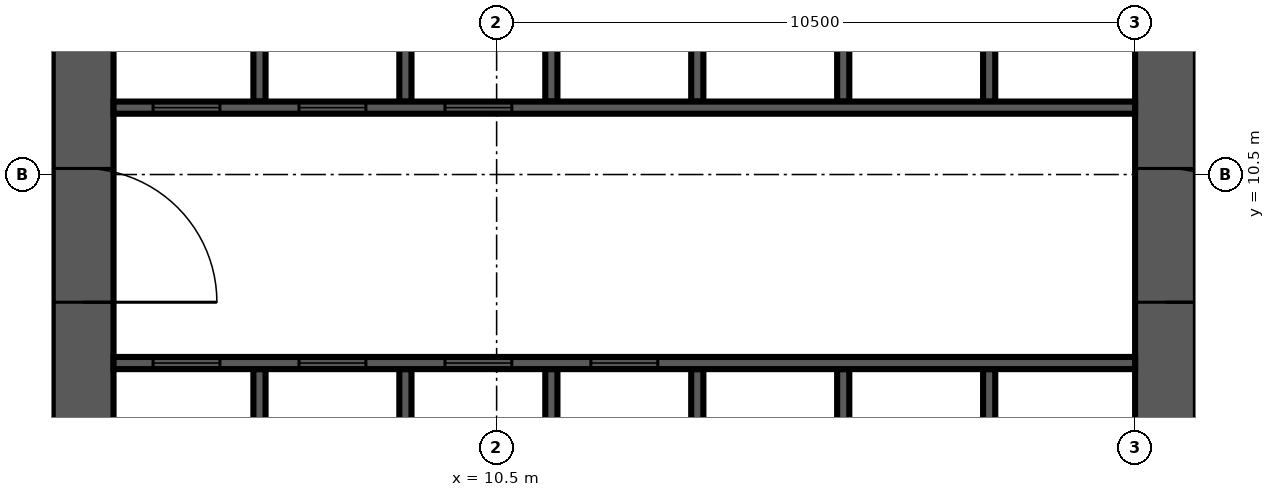
"""IFC4 building model, lengths in metres.
Left out: names, types, materials, properties, quantities, classifications, styles, units other than length and angle.
Written with IfcOpenShell. Run it as: python <this file> out.ifc"""

import sys

from ifc_helpers import new_model, si_unit, direction, frame, frame_2d, origin, place, context, subcontext, project, spatial, rectangle, extrude, source, transform, mapped, element, fill, save


model = new_model("IFC4")
c1 = context("Model", 3, precision=1e-05, world=origin(), true_north=direction((0.0, 1.0)))
c2 = subcontext(c1, "Body", "Model", "MODEL_VIEW")
j1 = project(units=[si_unit("LENGTHUNIT", "METRE"), si_unit("PLANEANGLEUNIT", "RADIAN")], contexts=[c1])
p1 = place(None, origin())
s1 = spatial("IfcSite", under=j1, at=p1, CompositionType="ELEMENT")
p2 = place(p1, origin())
s2 = spatial("IfcBuilding", under=s1, at=p2, CompositionType="ELEMENT")
p3 = place(p2, frame((0.0, 0.0, 141.3)))
s3 = spatial("IfcBuildingStorey", under=s2, at=p3, CompositionType="ELEMENT", Elevation=141.3)
m1 = source(origin(), c2, "Body", "SweptSolid", [
    extrude(rectangle(XDim=17.8, YDim=1.0, at=frame_2d((8.9, 0.0))), origin(), (0.0, 0.0, 1.0), 4.2),
])
p4 = place(p3, frame((3.7, 4.2, 0.0), z_axis=(0.0, 0.0, 1.0), x_axis=(0.0, 1.0, 0.0)))
e1 = element("IfcWall", 1, at=p4, inside=s3, PredefinedType="SHEAR", context=c2, shape_type="MappedRepresentation", body=[
    mapped(m1, transform((0.0, 0.0, 0.0), scale=1.0)),
])
m2 = source(origin(), c2, "Body", "SweptSolid", [
    extrude(rectangle(XDim=2.2, YDim=2.1, at=frame_2d((1.1, 1.05))), frame((0.0, 0.51, 0.0), z_axis=(0.0, -1.0, 0.0), x_axis=(1.0, 0.0, 0.0)), (0.0, 0.0, 1.0), 1.02),
])
p5 = place(p4, frame((4.2, 0.0, 0.0)))
e2 = element("IfcOpeningElement", 2, at=p5, cuts=e1, PredefinedType="OPENING", context=c2, shape_type="MappedRepresentation", body=[
    mapped(m2, transform((0.0, 0.0, 0.0), scale=1.0)),
])
m3 = source(origin(), c2, "Body", "SweptSolid", [
    extrude(rectangle(XDim=0.9, YDim=2.1, at=frame_2d((0.45, 1.05))), frame((0.0, 0.51, 0.0), z_axis=(0.0, -1.0, 0.0), x_axis=(1.0, 0.0, 0.0)), (0.0, 0.0, 1.0), 1.02),
])
p6 = place(p4, frame((10.95, 0.0, 0.0)))
e3 = element("IfcOpeningElement", 3, at=p6, cuts=e1, PredefinedType="OPENING", context=c2, shape_type="MappedRepresentation", body=[
    mapped(m3, transform((0.0, 0.0, 0.0), scale=1.0)),
])
m4 = source(origin(), c2, "Body", "SweptSolid", [
    extrude(rectangle(XDim=16.8, YDim=1.0, at=frame_2d((8.4, 0.0))), origin(), (0.0, 0.0, 1.0), 4.2),
])
p7 = place(p3, frame((21.5, 4.2, 0.0), z_axis=(0.0, 0.0, 1.0), x_axis=(0.0, 1.0, 0.0)))
e4 = element("IfcWall", 4, at=p7, inside=s3, PredefinedType="SHEAR", context=c2, shape_type="MappedRepresentation", body=[
    mapped(m4, transform((0.0, 0.0, 0.0), scale=1.0)),
])
p8 = place(p7, frame((4.2, 0.0, 0.0)))
e5 = element("IfcOpeningElement", 5, at=p8, cuts=e4, PredefinedType="OPENING", context=c2, shape_type="MappedRepresentation", body=[
    mapped(m2, transform((0.0, 0.0, 0.0), scale=1.0)),
])
m5 = source(origin(), c2, "Body", "SweptSolid", [
    extrude(rectangle(XDim=1.2, YDim=2.1, at=frame_2d((0.6, 1.05))), frame((0.0, 0.51, 0.0), z_axis=(0.0, -1.0, 0.0), x_axis=(1.0, 0.0, 0.0)), (0.0, 0.0, 1.0), 1.02),
])
p9 = place(p7, frame((14.7, 0.0, 0.0)))
e6 = element("IfcOpeningElement", 6, at=p9, cuts=e4, PredefinedType="OPENING", context=c2, shape_type="MappedRepresentation", body=[
    mapped(m5, transform((0.0, 0.0, 0.0), scale=1.0)),
])
m6 = source(origin(), c2, "Body", "SweptSolid", [
    extrude(rectangle(XDim=3.1, YDim=0.2, at=frame_2d((1.55, 0.0))), origin(), (0.0, 0.0, 1.0), 4.2),
])
for number, where, z_axis, x_axis in (
    (7, (6.6, 4.2, 0.0), (0.0, 0.0, 1.0), (0.0, 1.0, 0.0)),
    (8, (9.0, 4.2, 0.0), (0.0, 0.0, 1.0), (0.0, 1.0, 0.0)),
    (9, (11.4, 4.2, 0.0), (0.0, 0.0, 1.0), (0.0, 1.0, 0.0)),
    (10, (13.8, 4.2, 0.0), (0.0, 0.0, 1.0), (0.0, 1.0, 0.0)),
    (11, (16.2, 4.2, 0.0), (0.0, 0.0, 1.0), (0.0, 1.0, 0.0)),
    (12, (18.6, 4.2, 0.0), (0.0, 0.0, 1.0), (0.0, 1.0, 0.0)),
):
    element("IfcWall", number, at=place(p3, frame(where, z_axis=z_axis, x_axis=x_axis)), inside=s3, PredefinedType="SOLIDWALL", context=c2, shape_type="MappedRepresentation", body=[
        mapped(m6, transform((0.0, 0.0, 0.0), scale=1.0)),
    ])
m7 = source(origin(), c2, "Body", "SweptSolid", [
    extrude(rectangle(XDim=3.0, YDim=0.2, at=frame_2d((1.5, 0.0))), origin(), (0.0, 0.0, 1.0), 4.2),
])
for number, where, z_axis, x_axis in (
    (13, (6.6, 11.7, 0.0), (0.0, 0.0, 1.0), (0.0, 1.0, 0.0)),
    (14, (9.0, 11.7, 0.0), (0.0, 0.0, 1.0), (0.0, 1.0, 0.0)),
    (15, (11.4, 11.7, 0.0), (0.0, 0.0, 1.0), (0.0, 1.0, 0.0)),
    (16, (13.8, 11.7, 0.0), (0.0, 0.0, 1.0), (0.0, 1.0, 0.0)),
    (17, (16.2, 11.7, 0.0), (0.0, 0.0, 1.0), (0.0, 1.0, 0.0)),
    (18, (18.6, 11.7, 0.0), (0.0, 0.0, 1.0), (0.0, 1.0, 0.0)),
):
    element("IfcWall", number, at=place(p3, frame(where, z_axis=z_axis, x_axis=x_axis)), inside=s3, PredefinedType="SOLIDWALL", context=c2, shape_type="MappedRepresentation", body=[
        mapped(m7, transform((0.0, 0.0, 0.0), scale=1.0)),
    ])
m8 = source(origin(), c2, "Body", "SweptSolid", [
    extrude(rectangle(XDim=16.8, YDim=0.2, at=frame_2d((8.4, 0.0))), origin(), (0.0, 0.0, 1.0), 4.2),
])
p10 = place(p3, frame((4.2, 7.4, 0.0), z_axis=(0.0, 0.0, 1.0), x_axis=(1.0, 0.0, 0.0)))
e19 = element("IfcWall", 19, at=p10, inside=s3, PredefinedType="SOLIDWALL", context=c2, shape_type="MappedRepresentation", body=[
    mapped(m8, transform((0.0, 0.0, 0.0), scale=1.0)),
])
m9 = source(origin(), c2, "Body", "SweptSolid", [
    extrude(rectangle(XDim=1.1, YDim=2.1, at=frame_2d((0.55, 1.05))), frame((0.0, 0.11, 0.0), z_axis=(0.0, -1.0, 0.0), x_axis=(1.0, 0.0, 0.0)), (0.0, 0.0, 1.0), 0.22),
])
p11 = place(p10, frame((0.65, 0.0, 0.0)))
e20 = element("IfcOpeningElement", 20, at=p11, cuts=e19, PredefinedType="OPENING", context=c2, shape_type="MappedRepresentation", body=[
    mapped(m9, transform((0.0, 0.0, 0.0), scale=1.0)),
])
p12 = place(p10, frame((3.05, 0.0, 0.0)))
e21 = element("IfcOpeningElement", 21, at=p12, cuts=e19, PredefinedType="OPENING", context=c2, shape_type="MappedRepresentation", body=[
    mapped(m9, transform((0.0, 0.0, 0.0), scale=1.0)),
])
p13 = place(p10, frame((5.45, 0.0, 0.0)))
e22 = element("IfcOpeningElement", 22, at=p13, cuts=e19, PredefinedType="OPENING", context=c2, shape_type="MappedRepresentation", body=[
    mapped(m9, transform((0.0, 0.0, 0.0), scale=1.0)),
])
p14 = place(p10, frame((7.85, 0.0, 0.0)))
e23 = element("IfcOpeningElement", 23, at=p14, cuts=e19, PredefinedType="OPENING", context=c2, shape_type="MappedRepresentation", body=[
    mapped(m9, transform((0.0, 0.0, 0.0), scale=1.0)),
])
p15 = place(p3, frame((4.2, 11.6, 0.0), z_axis=(0.0, 0.0, 1.0), x_axis=(1.0, 0.0, 0.0)))
e24 = element("IfcWall", 24, at=p15, inside=s3, PredefinedType="SOLIDWALL", context=c2, shape_type="MappedRepresentation", body=[
    mapped(m8, transform((0.0, 0.0, 0.0), scale=1.0)),
])
p16 = place(p15, frame((0.65, 0.0, 0.0)))
e25 = element("IfcOpeningElement", 25, at=p16, cuts=e24, PredefinedType="OPENING", context=c2, shape_type="MappedRepresentation", body=[
    mapped(m9, transform((0.0, 0.0, 0.0), scale=1.0)),
])
p17 = place(p15, frame((3.05, 0.0, 0.0)))
e26 = element("IfcOpeningElement", 26, at=p17, cuts=e24, PredefinedType="OPENING", context=c2, shape_type="MappedRepresentation", body=[
    mapped(m9, transform((0.0, 0.0, 0.0), scale=1.0)),
])
p18 = place(p15, frame((5.45, 0.0, 0.0)))
e27 = element("IfcOpeningElement", 27, at=p18, cuts=e24, PredefinedType="OPENING", context=c2, shape_type="MappedRepresentation", body=[
    mapped(m9, transform((0.0, 0.0, 0.0), scale=1.0)),
])
m10 = source(origin(), c2, "Body", "SweptSolid", [
    extrude(rectangle(XDim=1.1, YDim=2.1, at=frame_2d((0.55, 1.05))), frame((0.0, 0.025, 0.0), z_axis=(0.0, -1.0, 0.0), x_axis=(1.0, 0.0, 0.0)), (0.0, 0.0, 1.0), 0.05),
])
p19 = place(p11, origin())
e28 = element("IfcDoor", 28, at=p19, inside=s3, OperationType="SLIDING_TO_LEFT", PredefinedType="DOOR", context=c2, shape_type="MappedRepresentation", body=[
    mapped(m10, transform((0.0, 0.0, 0.0), scale=1.0)),
])
fill(e20, e28)
p20 = place(p12, origin())
e29 = element("IfcDoor", 29, at=p20, inside=s3, OperationType="SLIDING_TO_LEFT", PredefinedType="DOOR", context=c2, shape_type="MappedRepresentation", body=[
    mapped(m10, transform((0.0, 0.0, 0.0), scale=1.0)),
])
fill(e21, e29)
p21 = place(p13, origin())
e30 = element("IfcDoor", 30, at=p21, inside=s3, OperationType="SLIDING_TO_LEFT", PredefinedType="DOOR", context=c2, shape_type="MappedRepresentation", body=[
    mapped(m10, transform((0.0, 0.0, 0.0), scale=1.0)),
])
fill(e22, e30)
p22 = place(p14, origin())
e31 = element("IfcDoor", 31, at=p22, inside=s3, OperationType="SLIDING_TO_LEFT", PredefinedType="DOOR", context=c2, shape_type="MappedRepresentation", body=[
    mapped(m10, transform((0.0, 0.0, 0.0), scale=1.0)),
])
fill(e23, e31)
p23 = place(p16, origin())
e32 = element("IfcDoor", 32, at=p23, inside=s3, OperationType="SLIDING_TO_LEFT", PredefinedType="DOOR", context=c2, shape_type="MappedRepresentation", body=[
    mapped(m10, transform((0.0, 0.0, 0.0), scale=1.0)),
])
fill(e25, e32)
p24 = place(p17, origin())
e33 = element("IfcDoor", 33, at=p24, inside=s3, OperationType="SLIDING_TO_LEFT", PredefinedType="DOOR", context=c2, shape_type="MappedRepresentation", body=[
    mapped(m10, transform((0.0, 0.0, 0.0), scale=1.0)),
])
fill(e26, e33)
p25 = place(p18, origin())
e34 = element("IfcDoor", 34, at=p25, inside=s3, OperationType="SLIDING_TO_LEFT", PredefinedType="DOOR", context=c2, shape_type="MappedRepresentation", body=[
    mapped(m10, transform((0.0, 0.0, 0.0), scale=1.0)),
])
fill(e27, e34)
m11 = source(origin(), c2, "Body", "SweptSolid", [
    extrude(rectangle(XDim=2.2, YDim=2.1, at=frame_2d((1.1, 1.05))), frame((0.0, 0.025, 0.0), z_axis=(0.0, -1.0, 0.0), x_axis=(1.0, 0.0, 0.0)), (0.0, 0.0, 1.0), 0.05),
])
p26 = place(p8, origin())
e35 = element("IfcDoor", 35, at=p26, inside=s3, OperationType="DOUBLE_DOOR_SINGLE_SWING", PredefinedType="DOOR", context=c2, shape_type="MappedRepresentation", body=[
    mapped(m11, transform((0.0, 0.0, 0.0), scale=1.0)),
])
fill(e5, e35)
p27 = place(p5, origin())
e36 = element("IfcDoor", 36, at=p27, inside=s3, OperationType="DOUBLE_DOOR_SINGLE_SWING", PredefinedType="DOOR", context=c2, shape_type="MappedRepresentation", body=[
    mapped(m11, transform((0.0, 0.0, 0.0), scale=1.0)),
])
fill(e2, e36)
save(model, sys.argv[1])
